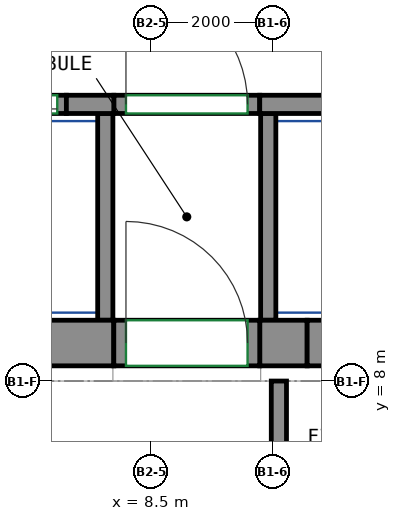
"""IFC4 building model, lengths in metres.
Left out: names, types, materials, properties, quantities, classifications, styles, units other than length and angle.
Written with IfcOpenShell. Run it as: python <this file> out.ifc"""

import sys

from ifc_helpers import new_model, si_unit, direction, frame, frame_2d, origin, place, context, subcontext, project, spatial, rectangle, extrude, source, transform, mapped, element, fill, save


model = new_model("IFC4")
c1 = context("Model", 3, precision=1e-05, world=origin(), true_north=direction((0.0, 1.0)))
c2 = subcontext(c1, "Body", "Model", "MODEL_VIEW")
j1 = project(units=[si_unit("LENGTHUNIT", "METRE"), si_unit("PLANEANGLEUNIT", "RADIAN")], contexts=[c1])
p1 = place(None, origin())
s1 = spatial("IfcSite", under=j1, at=p1, CompositionType="ELEMENT")
p2 = place(p1, origin())
s2 = spatial("IfcBuilding", under=s1, at=p2, CompositionType="ELEMENT")
p3 = place(p2, frame((0.0, 0.0, 259.4)))
s3 = spatial("IfcBuildingStorey", under=s2, at=p3, CompositionType="ELEMENT", Elevation=259.4)
m1 = source(origin(), c2, "Body", "SweptSolid", [
    extrude(rectangle(XDim=14.18, YDim=0.75, at=frame_2d((7.09, 0.0))), origin(), (0.0, 0.0, 1.0), 3.0),
])
p4 = place(p3, frame((-6.29, 8.625, 0.0), z_axis=(0.0, 0.0, 1.0), x_axis=(1.0, 0.0, 0.0)))
e1 = element("IfcWall", 1, at=p4, inside=s3, PredefinedType="SHEAR", context=c2, shape_type="MappedRepresentation", body=[
    mapped(m1, transform((0.0, 0.0, 0.0))),
])
m2 = source(origin(), c2, "Body", "SweptSolid", [
    extrude(rectangle(XDim=0.78, YDim=0.75, at=frame_2d((0.39, 0.0))), origin(), (0.0, 0.0, 1.0), 3.0),
])
p5 = place(p3, frame((10.29, 8.625, 0.0), z_axis=(0.0, 0.0, 1.0), x_axis=(1.0, 0.0, 0.0)))
e2 = element("IfcWall", 2, at=p5, inside=s3, PredefinedType="SHEAR", context=c2, shape_type="MappedRepresentation", body=[
    mapped(m2, transform((0.0, 0.0, 0.0))),
])
m3 = source(origin(), c2, "Body", "SweptSolid", [
    extrude(rectangle(XDim=0.78, YDim=0.3, at=frame_2d((0.39, 0.0))), origin(), (0.0, 0.0, 1.0), 3.0),
])
p6 = place(p3, frame((7.11, 12.55, 0.0), z_axis=(0.0, 0.0, 1.0), x_axis=(1.0, 0.0, 0.0)))
e3 = element("IfcWall", 3, at=p6, inside=s3, PredefinedType="SHEAR", context=c2, shape_type="MappedRepresentation", body=[
    mapped(m3, transform((0.0, 0.0, 0.0))),
])
m4 = source(origin(), c2, "Body", "SweptSolid", [
    extrude(rectangle(XDim=2.82, YDim=0.3, at=frame_2d((1.41, 0.0))), origin(), (0.0, 0.0, 1.0), 3.0),
])
p7 = place(p3, frame((10.29, 12.55, 0.0), z_axis=(0.0, 0.0, 1.0), x_axis=(1.0, 0.0, 0.0)))
e4 = element("IfcWall", 4, at=p7, inside=s3, PredefinedType="SHEAR", context=c2, shape_type="MappedRepresentation", body=[
    mapped(m4, transform((0.0, 0.0, 0.0))),
])
m5 = source(origin(), c2, "Body", "SweptSolid", [
    extrude(rectangle(XDim=1.4, YDim=0.3, at=frame_2d((0.7, 0.0))), origin(), (0.0, 0.0, 1.0), 3.0),
])
p8 = place(p3, frame((5.71, 12.55, 0.0), z_axis=(0.0, 0.0, 1.0), x_axis=(1.0, 0.0, 0.0)))
e5 = element("IfcWall", 5, at=p8, inside=s3, PredefinedType="PARTITIONING", context=c2, shape_type="MappedRepresentation", body=[
    mapped(m5, transform((0.0, 0.0, 0.0))),
])
p9 = place(p8, frame((0.15, 0.0, 0.0)))
e6 = element("IfcOpeningElement", 6, at=p9, cuts=e5, PredefinedType="OPENING", context=c2, shape_type="SweptSolid", body=[
    extrude(rectangle(XDim=1.1, YDim=2.1, at=frame_2d((0.55, 1.05))), frame((0.0, 0.16, 0.0), z_axis=(0.0, -1.0, 0.0), x_axis=(1.0, 0.0, 0.0)), (0.0, 0.0, 1.0), 0.32),
])
m6 = source(origin(), c2, "Body", "SweptSolid", [
    extrude(rectangle(XDim=2.4, YDim=0.3, at=frame_2d((1.2, 0.0))), origin(), (0.0, 0.0, 1.0), 3.0),
])
p10 = place(p3, frame((7.89, 12.55, 0.0), z_axis=(0.0, 0.0, 1.0), x_axis=(1.0, 0.0, 0.0)))
e7 = element("IfcWall", 7, at=p10, inside=s3, PredefinedType="PARTITIONING", context=c2, shape_type="MappedRepresentation", body=[
    mapped(m6, transform((0.0, 0.0, 0.0))),
])
p11 = place(p10, frame((0.2, 0.0, 0.0)))
e8 = element("IfcOpeningElement", 8, at=p11, cuts=e7, PredefinedType="OPENING", context=c2, shape_type="SweptSolid", body=[
    extrude(rectangle(XDim=2.0, YDim=2.1, at=frame_2d((1.0, 1.05))), frame((0.0, 0.16, 0.0), z_axis=(0.0, -1.0, 0.0), x_axis=(1.0, 0.0, 0.0)), (0.0, 0.0, 1.0), 0.32),
])
m7 = source(origin(), c2, "Body", "SweptSolid", [
    extrude(rectangle(XDim=2.65, YDim=0.25, at=frame_2d((1.325, 0.0))), origin(), (0.0, 0.0, 1.0), 2.45),
])
p12 = place(p3, frame((10.605, 5.35, 0.0), z_axis=(0.0, 0.0, 1.0), x_axis=(0.0, 1.0, 0.0)))
e9 = element("IfcWall", 9, at=p12, inside=s3, PredefinedType="PARTITIONING", context=c2, shape_type="MappedRepresentation", body=[
    mapped(m7, transform((0.0, 0.0, 0.0))),
])
m8 = source(origin(), c2, "Body", "SweptSolid", [
    extrude(rectangle(XDim=3.4, YDim=0.25, at=frame_2d((1.7, 0.0))), origin(), (0.0, 0.0, 1.0), 3.0),
])
for number, where, z_axis, x_axis in (
    (10, (10.43, 9.0, 0.0), (0.0, 0.0, 1.0), (0.0, 1.0, 0.0)),
    (11, (7.75, 9.0, 0.0), (0.0, 0.0, 1.0), (0.0, 1.0, 0.0)),
):
    element("IfcWall", number, at=place(p3, frame(where, z_axis=z_axis, x_axis=x_axis)), inside=s3, PredefinedType="PARTITIONING", context=c2, shape_type="MappedRepresentation", body=[
        mapped(m8, transform((0.0, 0.0, 0.0))),
    ])
m9 = source(origin(), c2, "Body", "SweptSolid", [
    extrude(rectangle(XDim=2.4, YDim=0.75, at=frame_2d((1.2, 0.0))), origin(), (0.0, 0.0, 1.0), 2.7),
])
p13 = place(p3, frame((7.89, 8.625, 0.0), z_axis=(0.0, 0.0, 1.0), x_axis=(1.0, 0.0, 0.0)))
e12 = element("IfcWall", 12, at=p13, inside=s3, PredefinedType="PARTITIONING", context=c2, shape_type="MappedRepresentation", body=[
    mapped(m9, transform((0.0, 0.0, 0.0))),
])
p14 = place(p13, frame((0.2, 0.0, 0.0)))
e13 = element("IfcOpeningElement", 13, at=p14, cuts=e12, PredefinedType="OPENING", context=c2, shape_type="SweptSolid", body=[
    extrude(rectangle(XDim=2.0, YDim=2.1, at=frame_2d((1.0, 1.05))), frame((0.0, 0.385, 0.0), z_axis=(0.0, -1.0, 0.0), x_axis=(1.0, 0.0, 0.0)), (0.0, 0.0, 1.0), 0.77),
])
m10 = source(origin(), c2, "Body", "SweptSolid", [
    extrude(rectangle(XDim=1.4, YDim=0.75, at=frame_2d((0.7, 0.0))), origin(), (0.0, 0.0, 1.0), 2.7),
])
p15 = place(p3, frame((11.07, 8.625, 0.0), z_axis=(0.0, 0.0, 1.0), x_axis=(1.0, 0.0, 0.0)))
e14 = element("IfcWall", 14, at=p15, inside=s3, PredefinedType="PARTITIONING", context=c2, shape_type="MappedRepresentation", body=[
    mapped(m10, transform((0.0, 0.0, 0.0))),
])
p16 = place(p15, frame((0.25, 0.0, 0.0)))
e15 = element("IfcOpeningElement", 15, at=p16, cuts=e14, PredefinedType="OPENING", context=c2, shape_type="SweptSolid", body=[
    extrude(rectangle(XDim=0.9, YDim=2.1, at=frame_2d((0.45, 1.05))), frame((0.0, 0.385, 0.0), z_axis=(0.0, -1.0, 0.0), x_axis=(1.0, 0.0, 0.0)), (0.0, 0.0, 1.0), 0.77),
])
p17 = place(p11, origin())
e16 = element("IfcDoor", 16, at=p17, inside=s3, OperationType="DOUBLE_DOOR_SINGLE_SWING", PredefinedType="DOOR", context=c2, shape_type="SweptSolid", body=[
    extrude(rectangle(XDim=2.0, YDim=2.1, at=frame_2d((1.0, 1.05))), frame((0.0, 0.025, 0.0), z_axis=(0.0, -1.0, 0.0), x_axis=(1.0, 0.0, 0.0)), (0.0, 0.0, 1.0), 0.05),
])
fill(e8, e16)
p18 = place(p14, origin())
e17 = element("IfcDoor", 17, at=p18, inside=s3, OperationType="DOUBLE_DOOR_SINGLE_SWING", PredefinedType="DOOR", context=c2, shape_type="SweptSolid", body=[
    extrude(rectangle(XDim=2.0, YDim=2.1, at=frame_2d((1.0, 1.05))), frame((0.0, 0.28, 0.0), z_axis=(0.0, -1.0, 0.0), x_axis=(1.0, 0.0, 0.0)), (0.0, 0.0, 1.0), 0.05),
])
fill(e13, e17)
p19 = place(p9, origin())
e18 = element("IfcDoor", 18, at=p19, inside=s3, OperationType="DOUBLE_DOOR_SLIDING", PredefinedType="DOOR", context=c2, shape_type="SweptSolid", body=[
    extrude(rectangle(XDim=1.1, YDim=2.1, at=frame_2d((0.55, 1.05))), frame((0.0, 0.025, 0.0), z_axis=(0.0, -1.0, 0.0), x_axis=(1.0, 0.0, 0.0)), (0.0, 0.0, 1.0), 0.05),
])
fill(e6, e18)
save(model, sys.argv[1])
